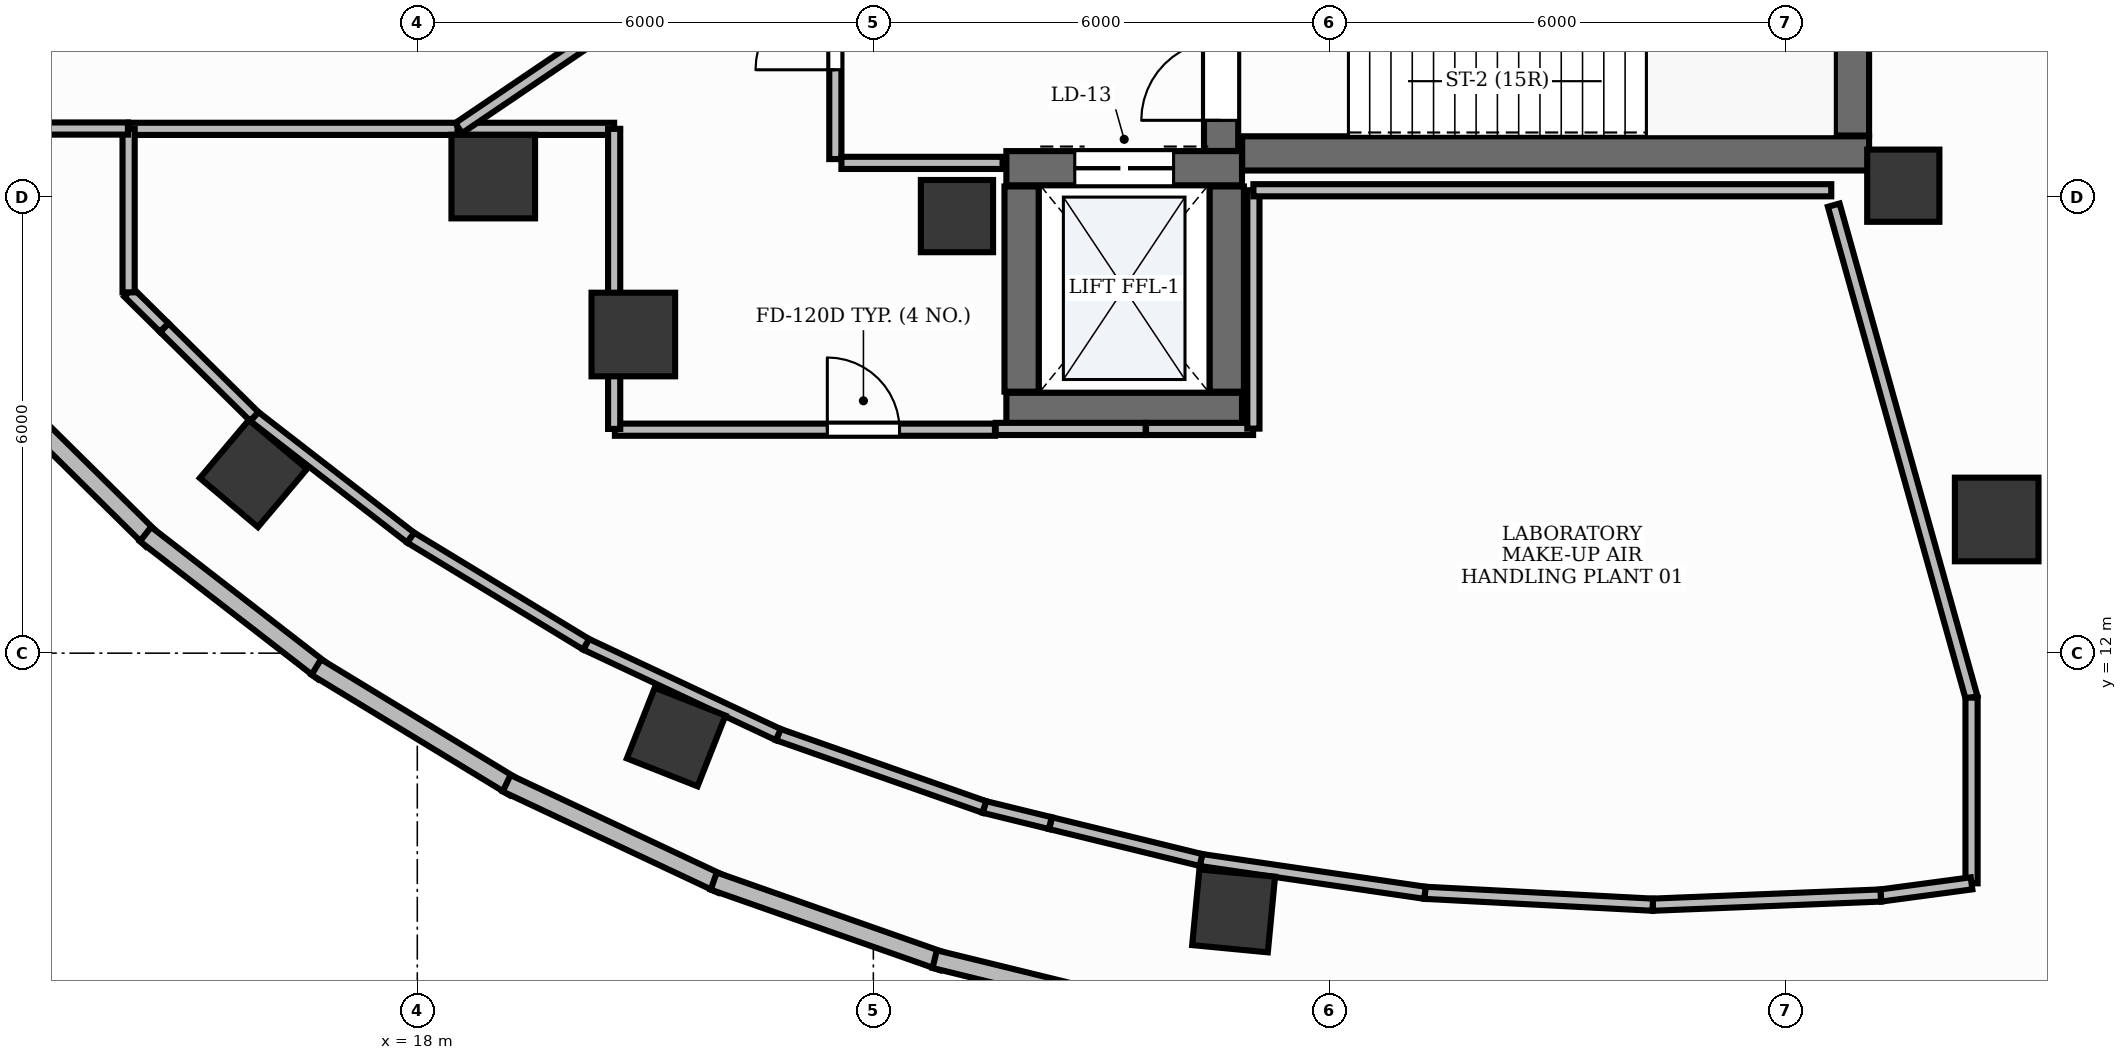
"""IFC4 building model, lengths in metres.
Left out: names, types, materials, properties, quantities, classifications, styles, units other than length and angle.
Written with IfcOpenShell. Run it as: python <this file> out.ifc"""

import sys

from ifc_helpers import new_model, si_unit, direction, frame, frame_2d, origin, origin_2d, place, context, subcontext, project, spatial, rectangle, extrude, element, fill, save


model = new_model("IFC4")
c1 = context("Model", 3, precision=1e-05, world=origin(), true_north=direction((0.0, 1.0)))
c2 = subcontext(c1, "Body", "Model", "MODEL_VIEW")
j1 = project(units=[si_unit("LENGTHUNIT", "METRE"), si_unit("PLANEANGLEUNIT", "RADIAN")], contexts=[c1])
p1 = place(None, origin())
s1 = spatial("IfcSite", under=j1, at=p1, CompositionType="ELEMENT")
p2 = place(p1, origin())
s2 = spatial("IfcBuilding", under=s1, at=p2, CompositionType="ELEMENT")
p3 = place(p2, frame((0.0, 0.0, 148.8)))
s3 = spatial("IfcBuildingStorey", under=s2, at=p3, CompositionType="ELEMENT", Elevation=148.8)
p4 = place(p3, frame((28.852, 18.575, 0.0), z_axis=(0.0, 0.0, 1.0), x_axis=(1.0, 0.0, 0.0)))
e1 = element("IfcWall", 1, at=p4, inside=s3, PredefinedType="SHEAR", context=c2, shape_type="SweptSolid", body=[
    extrude(rectangle(XDim=8.248, YDim=0.45, at=frame_2d((4.124, 0.0))), origin(), (0.0, 0.0, 1.0), 5.1),
])
p5 = place(p3, frame((36.875, 18.81, 0.0), z_axis=(0.0, 0.0, 1.0), x_axis=(0.0, 1.0, 0.0)))
e2 = element("IfcWall", 2, at=p5, inside=s3, PredefinedType="SHEAR", context=c2, shape_type="SweptSolid", body=[
    extrude(rectangle(XDim=3.08, YDim=0.45, at=frame_2d((1.54, 0.0))), origin(), (0.0, 0.0, 1.0), 5.1),
])
p6 = place(p3, frame((28.575, 18.607, 0.0), z_axis=(0.0, 0.0, 1.0), x_axis=(0.0, 1.0, 0.0)))
e3 = element("IfcWall", 3, at=p6, inside=s3, PredefinedType="SHEAR", context=c2, shape_type="SweptSolid", body=[
    extrude(rectangle(XDim=3.283, YDim=0.45, at=frame_2d((1.642, 0.0))), origin(), (0.0, 0.0, 1.0), 5.1),
])
p7 = place(p6, frame((0.403, 0.0, 0.0)))
e4 = element("IfcOpeningElement", 4, at=p7, cuts=e3, PredefinedType="OPENING", context=c2, shape_type="SweptSolid", body=[
    extrude(rectangle(XDim=1.05, YDim=2.15, at=frame_2d((0.525, 1.075))), frame((0.0, 0.24, 0.0), z_axis=(0.0, -1.0, 0.0), x_axis=(1.0, 0.0, 0.0)), (0.0, 0.0, 1.0), 0.48),
])
p8 = place(p3, frame((25.75, 15.2, 0.0), z_axis=(0.0, 0.0, 1.0), x_axis=(1.0, 0.0, 0.0)))
e5 = element("IfcWall", 5, at=p8, inside=s3, PredefinedType="SHEAR", context=c2, shape_type="SweptSolid", body=[
    extrude(rectangle(XDim=3.1, YDim=0.45, at=frame_2d((1.55, 0.0))), origin(), (0.0, 0.0, 1.0), 5.1),
])
p9 = place(p3, frame((25.75, 18.38, 0.0), z_axis=(0.0, 0.0, 1.0), x_axis=(1.0, 0.0, 0.0)))
e6 = element("IfcWall", 6, at=p9, inside=s3, PredefinedType="SHEAR", context=c2, shape_type="SweptSolid", body=[
    extrude(rectangle(XDim=3.1, YDim=0.45, at=frame_2d((1.55, 0.0))), origin(), (0.0, 0.0, 1.0), 5.1),
])
p10 = place(p9, frame((0.9, 0.0, 0.0)))
e7 = element("IfcOpeningElement", 7, at=p10, cuts=e6, PredefinedType="OPENING", context=c2, shape_type="SweptSolid", body=[
    extrude(rectangle(XDim=1.3, YDim=2.2, at=frame_2d((0.65, 1.1))), frame((0.0, 0.24, 0.0), z_axis=(0.0, -1.0, 0.0), x_axis=(1.0, 0.0, 0.0)), (0.0, 0.0, 1.0), 0.48),
])
for number, where, z_axis, x_axis in (
    (8, (25.95, 15.44, 0.0), (0.0, 0.0, 1.0), (0.0, 1.0, 0.0)),
    (9, (28.65, 15.44, 0.0), (0.0, 0.0, 1.0), (0.0, 1.0, 0.0)),
):
    element("IfcWall", number, at=place(p3, frame(where, z_axis=z_axis, x_axis=x_axis)), inside=s3, PredefinedType="SHEAR", context=c2, shape_type="SweptSolid", body=[
        extrude(rectangle(XDim=2.7, YDim=0.45, at=frame_2d((1.35, 0.0))), origin(), (0.0, 0.0, 1.0), 5.1),
    ])
for number, where, z_axis, x_axis in (
    (10, (25.1, 17.75, -0.0), (0.0, 0.0, 1.0), (1.0, 0.0, 0.0)),
    (11, (37.55, 18.15, -0.0), (0.0, 0.0, 1.0), (1.0, 0.0, 0.0)),
):
    element("IfcColumn", number, at=place(p3, frame(where, z_axis=z_axis, x_axis=x_axis)), inside=s3, PredefinedType="PILASTER", context=c2, shape_type="SweptSolid", body=[
        extrude(rectangle(XDim=0.95, YDim=0.95, at=origin_2d()), origin(), (0.0, 0.0, 1.0), 5.101),
    ])
p11 = place(p3, frame((19.0, 18.27, -0.0), z_axis=(0.0, 0.0, 1.0), x_axis=(1.0, 0.0, 0.0)))
e12 = element("IfcColumn", 12, at=p11, inside=s3, PredefinedType="COLUMN", context=c2, shape_type="SweptSolid", body=[
    extrude(rectangle(XDim=1.1, YDim=1.1, at=origin_2d()), origin(), (0.0, 0.0, 1.0), 5.101),
])
p12 = place(p3, frame((15.844, 14.363, -0.0), z_axis=(0.0, 0.0, 1.0), x_axis=(-0.764246456939, 0.644924300253, 0.0)))
e13 = element("IfcColumn", 13, at=p12, inside=s3, PredefinedType="COLUMN", context=c2, shape_type="SweptSolid", body=[
    extrude(rectangle(XDim=1.0, YDim=1.0, at=origin_2d()), origin(), (0.0, 0.0, 1.0), 5.101),
])
p13 = place(p3, frame((20.842, 16.192, -0.0), z_axis=(0.0, 0.0, 1.0), x_axis=(1.0, 0.0, 0.0)))
e14 = element("IfcColumn", 14, at=p13, inside=s3, PredefinedType="COLUMN", context=c2, shape_type="SweptSolid", body=[
    extrude(rectangle(XDim=1.1, YDim=1.1, at=origin_2d()), origin(), (0.0, 0.0, 1.0), 5.101),
])
for number, where, z_axis, x_axis in (
    (15, (21.406, 10.897, -0.0), (0.0, 0.0, 1.0), (-0.93, 0.367, 0.0)),
    (16, (28.74, 8.61, -0.0), (0.0, 0.0, 1.0), (-0.995, 0.095, 0.0)),
):
    element("IfcColumn", number, at=place(p3, frame(where, z_axis=z_axis, x_axis=x_axis)), inside=s3, PredefinedType="COLUMN", context=c2, shape_type="SweptSolid", body=[
        extrude(rectangle(XDim=1.0, YDim=1.0, at=origin_2d()), origin(), (0.0, 0.0, 1.0), 5.101),
    ])
p14 = place(p3, frame((38.779, 13.759, -0.0), z_axis=(0.0, 0.0, 1.0), x_axis=(1.0, 0.0, 0.0)))
e17 = element("IfcColumn", 17, at=p14, inside=s3, PredefinedType="COLUMN", context=c2, shape_type="SweptSolid", body=[
    extrude(rectangle(XDim=1.1, YDim=1.1, at=origin_2d()), origin(), (0.0, 0.0, 1.0), 5.101),
])
p15 = place(p3, frame((12.468, 15.508, 0.0), z_axis=(0.0, 0.0, 1.0), x_axis=(0.711430434375, -0.702756527572, 0.0)))
e18 = element("IfcWall", 18, at=p15, inside=s3, PredefinedType="STANDARD", context=c2, shape_type="SweptSolid", body=[
    extrude(rectangle(XDim=2.871, YDim=0.24, at=frame_2d((1.436, 0.0))), origin(), (0.0, 0.0, 1.0), 5.1),
])
p16 = place(p3, frame((14.425, 13.565, 0.0), z_axis=(0.0, 0.0, 1.0), x_axis=(0.790518877524, -0.612437673791, 0.0)))
e19 = element("IfcWall", 19, at=p16, inside=s3, PredefinedType="STANDARD", context=c2, shape_type="SweptSolid", body=[
    extrude(rectangle(XDim=2.96, YDim=0.24, at=frame_2d((1.48, 0.0))), origin(), (0.0, 0.0, 1.0), 4.67),
])
p17 = place(p3, frame((16.671, 11.817, 0.0), z_axis=(0.0, 0.0, 1.0), x_axis=(0.854572854074, -0.519331529063, 0.0)))
e20 = element("IfcWall", 20, at=p17, inside=s3, PredefinedType="STANDARD", context=c2, shape_type="SweptSolid", body=[
    extrude(rectangle(XDim=3.046, YDim=0.24, at=frame_2d((1.523, 0.0))), origin(), (0.0, 0.0, 1.0), 5.1),
])
p18 = place(p3, frame((19.175, 10.288, 0.0), z_axis=(0.0, 0.0, 1.0), x_axis=(0.905004459278, -0.425402078847, 0.0)))
e21 = element("IfcWall", 21, at=p18, inside=s3, PredefinedType="STANDARD", context=c2, shape_type="SweptSolid", body=[
    extrude(rectangle(XDim=3.126, YDim=0.24, at=frame_2d((1.563, 0.0))), origin(), (0.0, 0.0, 1.0), 4.67),
])
p19 = place(p3, frame((21.9, 9.001, 0.0), z_axis=(0.0, 0.0, 1.0), x_axis=(0.943485978809, -0.331412443626, 0.0)))
e22 = element("IfcWall", 22, at=p19, inside=s3, PredefinedType="STANDARD", context=c2, shape_type="SweptSolid", body=[
    extrude(rectangle(XDim=3.194, YDim=0.24, at=frame_2d((1.597, 0.0))), origin(), (0.0, 0.0, 1.0), 5.1),
])
p20 = place(p3, frame((24.807, 7.974, 0.0), z_axis=(0.0, 0.0, 1.0), x_axis=(0.971319985241, -0.237776126368, 0.0)))
e23 = element("IfcWall", 23, at=p20, inside=s3, PredefinedType="STANDARD", context=c2, shape_type="SweptSolid", body=[
    extrude(rectangle(XDim=3.249, YDim=0.24, at=frame_2d((1.625, 0.0))), origin(), (0.0, 0.0, 1.0), 5.1),
])
p21 = place(p3, frame((23.5, 18.5, 0.0), z_axis=(0.0, 0.0, 1.0), x_axis=(0.0, 1.0, 0.0)))
e24 = element("IfcWall", 24, at=p21, inside=s3, PredefinedType="PARTITIONING", context=c2, shape_type="SweptSolid", body=[
    extrude(rectangle(XDim=3.4, YDim=0.16, at=frame_2d((1.7, 0.0))), origin(), (0.0, 0.0, 1.0), 3.96),
])
p22 = place(p21, frame((1.175, 0.0, 0.0)))
e25 = element("IfcOpeningElement", 25, at=p22, cuts=e24, PredefinedType="OPENING", context=c2, shape_type="SweptSolid", body=[
    extrude(rectangle(XDim=1.05, YDim=2.15, at=frame_2d((0.525, 1.075))), frame((0.0, 0.095, 0.0), z_axis=(0.0, -1.0, 0.0), x_axis=(1.0, 0.0, 0.0)), (0.0, 0.0, 1.0), 0.19),
])
p23 = place(p3, frame((23.58, 18.45, 0.0), z_axis=(0.0, 0.0, 1.0), x_axis=(1.0, 0.0, 0.0)))
e26 = element("IfcWall", 26, at=p23, inside=s3, PredefinedType="PARTITIONING", context=c2, shape_type="SweptSolid", body=[
    extrude(rectangle(XDim=2.12, YDim=0.16, at=frame_2d((1.06, 0.0))), origin(), (0.0, 0.0, 1.0), 3.96),
])
p24 = place(p3, frame((20.6, 14.94, 0.0), z_axis=(0.0, 0.0, 1.0), x_axis=(1.0, 0.0, 0.0)))
e27 = element("IfcWall", 27, at=p24, inside=s3, PredefinedType="PARTITIONING", context=c2, shape_type="SweptSolid", body=[
    extrude(rectangle(XDim=5.0, YDim=0.16, at=frame_2d((2.5, 0.0))), origin(), (0.0, 0.0, 1.0), 3.96),
])
p25 = place(p24, frame((2.794, 0.0, 0.0)))
e28 = element("IfcOpeningElement", 28, at=p25, cuts=e27, PredefinedType="OPENING", context=c2, shape_type="SweptSolid", body=[
    extrude(rectangle(XDim=0.95, YDim=2.15, at=frame_2d((0.475, 1.075))), frame((0.0, 0.095, 0.0), z_axis=(0.0, -1.0, 0.0), x_axis=(1.0, 0.0, 0.0)), (0.0, 0.0, 1.0), 0.19),
])
p26 = place(p3, frame((14.202, 18.898, 0.0), z_axis=(0.0, 0.0, 1.0), x_axis=(1.0, 0.0, 0.0)))
e29 = element("IfcWall", 29, at=p26, inside=s3, PredefinedType="PARTITIONING", context=c2, shape_type="SweptSolid", body=[
    extrude(rectangle(XDim=4.328, YDim=0.16, at=frame_2d((2.164, 0.0))), origin(), (0.0, 0.0, 1.0), 3.96),
])
p27 = place(p3, frame((18.537, 18.898, 0.0), z_axis=(0.0, 0.0, 1.0), x_axis=(1.0, 0.0, 0.0)))
e30 = element("IfcWall", 30, at=p27, inside=s3, PredefinedType="PARTITIONING", context=c2, shape_type="SweptSolid", body=[
    extrude(rectangle(XDim=2.053, YDim=0.16, at=frame_2d((1.026, 0.0))), origin(), (0.0, 0.0, 1.0), 3.96),
])
p28 = place(p3, frame((20.59, 18.898, 0.0), z_axis=(0.0, 0.0, 1.0), x_axis=(0.0, -1.0, 0.0)))
e31 = element("IfcWall", 31, at=p28, inside=s3, PredefinedType="PARTITIONING", context=c2, shape_type="SweptSolid", body=[
    extrude(rectangle(XDim=3.948, YDim=0.16, at=frame_2d((1.974, 0.0))), origin(), (0.0, 0.0, 1.0), 3.96),
])
p29 = place(p3, frame((25.61, 14.95, 0.0), z_axis=(0.0, 0.0, 1.0), x_axis=(1.0, 0.0, 0.0)))
e32 = element("IfcWall", 32, at=p29, inside=s3, PredefinedType="PARTITIONING", context=c2, shape_type="SweptSolid", body=[
    extrude(rectangle(XDim=1.972, YDim=0.16, at=frame_2d((0.986, 0.0))), origin(), (0.0, 0.0, 1.0), 3.96),
])
p30 = place(p3, frame((27.587, 14.95, 0.0), z_axis=(0.0, 0.0, 1.0), x_axis=(1.0, 0.0, 0.0)))
e33 = element("IfcWall", 33, at=p30, inside=s3, PredefinedType="PARTITIONING", context=c2, shape_type="SweptSolid", body=[
    extrude(rectangle(XDim=1.409, YDim=0.16, at=frame_2d((0.705, 0.0))), origin(), (0.0, 0.0, 1.0), 3.96),
])
p31 = place(p3, frame((29.0, 14.954, 0.0), z_axis=(0.0, 0.0, 1.0), x_axis=(0.0, 1.0, 0.0)))
e34 = element("IfcWall", 34, at=p31, inside=s3, PredefinedType="PARTITIONING", context=c2, shape_type="SweptSolid", body=[
    extrude(rectangle(XDim=3.136, YDim=0.16, at=frame_2d((1.568, 0.0))), origin(), (0.0, 0.0, 1.0), 3.96),
])
p32 = place(p3, frame((29.0, 18.09, 0.0), z_axis=(0.0, 0.0, 1.0), x_axis=(1.0, 0.0, 0.0)))
e35 = element("IfcWall", 35, at=p32, inside=s3, PredefinedType="PARTITIONING", context=c2, shape_type="SweptSolid", body=[
    extrude(rectangle(XDim=7.602, YDim=0.16, at=frame_2d((3.801, 0.0))), origin(), (0.0, 0.0, 1.0), 3.96),
])
p33 = place(p3, frame((36.635, 17.894, 0.0), z_axis=(0.0, 0.0, 1.0), x_axis=(0.269468384464, -0.963009236599, 0.0)))
e36 = element("IfcWall", 36, at=p33, inside=s3, PredefinedType="PARTITIONING", context=c2, shape_type="SweptSolid", body=[
    extrude(rectangle(XDim=6.727, YDim=0.16, at=frame_2d((3.364, 0.0))), origin(), (0.0, 0.0, 1.0), 3.96),
])
p34 = place(p3, frame((38.448, 11.415, 0.0), z_axis=(0.0, 0.0, 1.0), x_axis=(0.0, -1.0, 0.0)))
e37 = element("IfcWall", 37, at=p34, inside=s3, PredefinedType="PARTITIONING", context=c2, shape_type="SweptSolid", body=[
    extrude(rectangle(XDim=2.443, YDim=0.16, at=frame_2d((1.222, 0.0))), origin(), (0.0, 0.0, 1.0), 3.96),
])
p35 = place(p3, frame((38.448, 8.972, 0.0), z_axis=(0.0, 0.0, 1.0), x_axis=(-0.991155201979, -0.132707820379, 0.0)))
e38 = element("IfcWall", 38, at=p35, inside=s3, PredefinedType="PARTITIONING", context=c2, shape_type="SweptSolid", body=[
    extrude(rectangle(XDim=1.205, YDim=0.16, at=frame_2d((0.603, 0.0))), origin(), (0.0, 0.0, 1.0), 3.96),
])
p36 = place(p3, frame((37.253, 8.812, 0.0), z_axis=(0.0, 0.0, 1.0), x_axis=(-0.999189222559, -0.040260371605, 0.0)))
e39 = element("IfcWall", 39, at=p36, inside=s3, PredefinedType="PARTITIONING", context=c2, shape_type="SweptSolid", body=[
    extrude(rectangle(XDim=3.002, YDim=0.16, at=frame_2d((1.501, 0.0))), origin(), (0.0, 0.0, 1.0), 3.96),
])
p37 = place(p3, frame((34.254, 8.691, 0.0), z_axis=(0.0, 0.0, 1.0), x_axis=(-0.998638877547, 0.052157379655, 0.0)))
e40 = element("IfcWall", 40, at=p37, inside=s3, PredefinedType="PARTITIONING", context=c2, shape_type="SweptSolid", body=[
    extrude(rectangle(XDim=3.0, YDim=0.16, at=frame_2d((1.5, 0.0))), origin(), (0.0, 0.0, 1.0), 3.96),
])
p38 = place(p3, frame((31.257, 8.847, 0.0), z_axis=(0.0, 0.0, 1.0), x_axis=(-0.989461637153, 0.144795264436, 0.0)))
e41 = element("IfcWall", 41, at=p38, inside=s3, PredefinedType="PARTITIONING", context=c2, shape_type="SweptSolid", body=[
    extrude(rectangle(XDim=2.978, YDim=0.16, at=frame_2d((1.489, 0.0))), origin(), (0.0, 0.0, 1.0), 3.96),
])
p39 = place(p3, frame((28.311, 9.279, 0.0), z_axis=(0.0, 0.0, 1.0), x_axis=(-0.971322169491, 0.237767203488, 0.0)))
e42 = element("IfcWall", 42, at=p39, inside=s3, PredefinedType="PARTITIONING", context=c2, shape_type="SweptSolid", body=[
    extrude(rectangle(XDim=2.037, YDim=0.16, at=frame_2d((1.019, 0.0))), origin(), (0.0, 0.0, 1.0), 3.96),
])
p40 = place(p3, frame((26.328, 9.764, 0.0), z_axis=(0.0, 0.0, 1.0), x_axis=(-0.971320502907, 0.237774011685, 0.0)))
e43 = element("IfcWall", 43, at=p40, inside=s3, PredefinedType="PARTITIONING", context=c2, shape_type="SweptSolid", body=[
    extrude(rectangle(XDim=0.893, YDim=0.16, at=frame_2d((0.447, 0.0))), origin(), (0.0, 0.0, 1.0), 3.96),
])
p41 = place(p3, frame((25.46, 9.977, 0.0), z_axis=(0.0, 0.0, 1.0), x_axis=(-0.943496054003, 0.331383759531, 0.0)))
e44 = element("IfcWall", 44, at=p41, inside=s3, PredefinedType="PARTITIONING", context=c2, shape_type="SweptSolid", body=[
    extrude(rectangle(XDim=2.873, YDim=0.16, at=frame_2d((1.436, 0.0))), origin(), (0.0, 0.0, 1.0), 3.96),
])
p42 = place(p3, frame((22.75, 10.928, 0.0), z_axis=(0.0, 0.0, 1.0), x_axis=(-0.905016637479, 0.425376169861, 0.0)))
e45 = element("IfcWall", 45, at=p42, inside=s3, PredefinedType="PARTITIONING", context=c2, shape_type="SweptSolid", body=[
    extrude(rectangle(XDim=2.794, YDim=0.16, at=frame_2d((1.397, 0.0))), origin(), (0.0, 0.0, 1.0), 3.96),
])
p43 = place(p3, frame((20.221, 12.117, 0.0), z_axis=(0.0, 0.0, 1.0), x_axis=(-0.854561256141, 0.519350613269, 0.0)))
e46 = element("IfcWall", 46, at=p43, inside=s3, PredefinedType="PARTITIONING", context=c2, shape_type="SweptSolid", body=[
    extrude(rectangle(XDim=2.702, YDim=0.16, at=frame_2d((1.351, 0.0))), origin(), (0.0, 0.0, 1.0), 3.96),
])
p44 = place(p3, frame((17.911, 13.521, 0.0), z_axis=(0.0, 0.0, 1.0), x_axis=(-0.790528685489, 0.612425013711, 0.0)))
e47 = element("IfcWall", 47, at=p44, inside=s3, PredefinedType="PARTITIONING", context=c2, shape_type="SweptSolid", body=[
    extrude(rectangle(XDim=2.6, YDim=0.16, at=frame_2d((1.3, 0.0))), origin(), (0.0, 0.0, 1.0), 3.96),
])
p45 = place(p3, frame((15.855, 15.113, 0.0), z_axis=(0.0, 0.0, 1.0), x_axis=(-0.711498621038, 0.702687492604, 0.0)))
e48 = element("IfcWall", 48, at=p45, inside=s3, PredefinedType="PARTITIONING", context=c2, shape_type="SweptSolid", body=[
    extrude(rectangle(XDim=1.663, YDim=0.16, at=frame_2d((0.831, 0.0))), origin(), (0.0, 0.0, 1.0), 3.96),
])
p46 = place(p3, frame((14.67, 16.285, 0.0), z_axis=(0.0, 0.0, 1.0), x_axis=(-0.711551531629, 0.702633914522, 0.0)))
e49 = element("IfcWall", 49, at=p46, inside=s3, PredefinedType="PARTITIONING", context=c2, shape_type="SweptSolid", body=[
    extrude(rectangle(XDim=0.657, YDim=0.16, at=frame_2d((0.329, 0.0))), origin(), (0.0, 0.0, 1.0), 3.96),
])
p47 = place(p3, frame((14.202, 16.747, 0.0), z_axis=(0.0, 0.0, 1.0), x_axis=(0.0, 1.0, 0.0)))
e50 = element("IfcWall", 50, at=p47, inside=s3, PredefinedType="PARTITIONING", context=c2, shape_type="SweptSolid", body=[
    extrude(rectangle(XDim=2.151, YDim=0.16, at=frame_2d((1.076, 0.0))), origin(), (0.0, 0.0, 1.0), 3.96),
])
p48 = place(p3, frame((20.59, 20.293, 0.0), z_axis=(0.0, 0.0, 1.0), x_axis=(-0.828075588366, -0.560616464217, 0.0)))
e51 = element("IfcWall", 51, at=p48, inside=s3, PredefinedType="PARTITIONING", context=c2, shape_type="SweptSolid", body=[
    extrude(rectangle(XDim=2.47, YDim=0.16, at=frame_2d((1.235, 0.0))), origin(), (0.0, 0.0, 1.0), 3.96),
])
p49 = place(p3, frame((14.193, 18.902, 0.0), z_axis=(0.0, 0.0, 1.0), x_axis=(-1.0, 0.0, 0.0)))
e52 = element("IfcWall", 52, at=p49, inside=s3, PredefinedType="PARTITIONING", context=c2, shape_type="SweptSolid", body=[
    extrude(rectangle(XDim=1.673, YDim=0.16, at=frame_2d((0.836, 0.0))), origin(), (0.0, 0.0, 1.0), 3.96),
])
p50 = place(p7, origin())
e53 = element("IfcDoor", 53, at=p50, inside=s3, OperationType="SINGLE_SWING_LEFT", PredefinedType="DOOR", context=c2, shape_type="SweptSolid", body=[
    extrude(rectangle(XDim=1.05, YDim=2.15, at=frame_2d((0.525, 1.075))), frame((0.0, 0.025, 0.0), z_axis=(0.0, -1.0, 0.0), x_axis=(1.0, 0.0, 0.0)), (0.0, 0.0, 1.0), 0.05),
])
fill(e4, e53)
p51 = place(p10, origin())
e54 = element("IfcDoor", 54, at=p51, inside=s3, OperationType="DOUBLE_DOOR_SLIDING", PredefinedType="DOOR", context=c2, shape_type="SweptSolid", body=[
    extrude(rectangle(XDim=1.3, YDim=2.2, at=frame_2d((0.65, 1.1))), frame((0.0, 0.025, 0.0), z_axis=(0.0, -1.0, 0.0), x_axis=(1.0, 0.0, 0.0)), (0.0, 0.0, 1.0), 0.05),
])
fill(e7, e54)
p52 = place(p22, origin())
e55 = element("IfcDoor", 55, at=p52, inside=s3, OperationType="SINGLE_SWING_LEFT", PredefinedType="DOOR", context=c2, shape_type="SweptSolid", body=[
    extrude(rectangle(XDim=1.05, YDim=2.15, at=frame_2d((0.525, 1.075))), frame((0.0, 0.025, 0.0), z_axis=(0.0, -1.0, 0.0), x_axis=(1.0, 0.0, 0.0)), (0.0, 0.0, 1.0), 0.05),
])
fill(e25, e55)
p53 = place(p25, origin())
e56 = element("IfcDoor", 56, at=p53, inside=s3, OperationType="SINGLE_SWING_LEFT", PredefinedType="DOOR", context=c2, shape_type="SweptSolid", body=[
    extrude(rectangle(XDim=0.95, YDim=2.15, at=frame_2d((0.475, 1.075))), frame((0.0, 0.025, 0.0), z_axis=(0.0, -1.0, 0.0), x_axis=(1.0, 0.0, 0.0)), (0.0, 0.0, 1.0), 0.05),
])
fill(e28, e56)
save(model, sys.argv[1])
